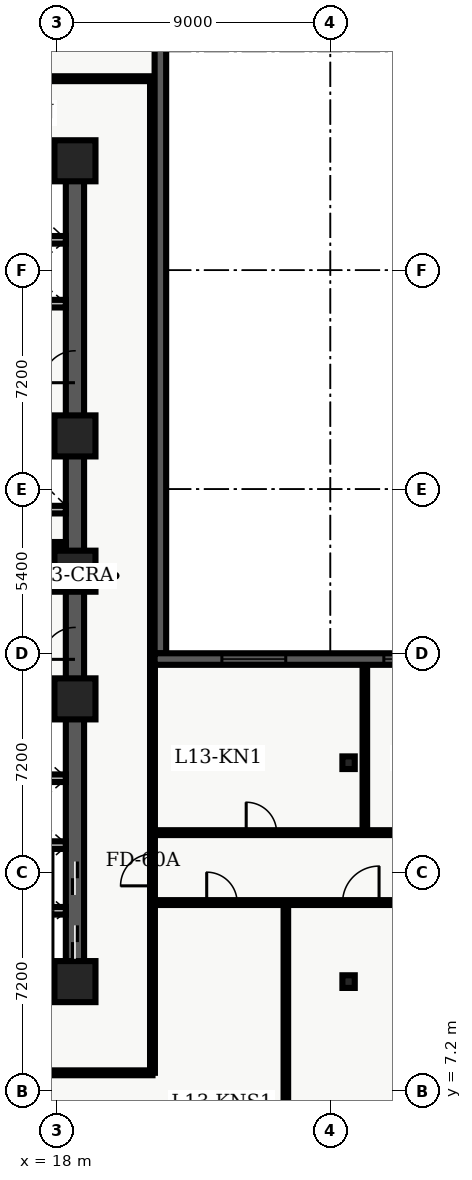
"""IFC4 building model, lengths in metres.
Left out: names, types, materials, properties, quantities, classifications, styles, units other than length and angle.
Written with IfcOpenShell. Run it as: python <this file> out.ifc"""

import sys

from ifc_helpers import new_model, entity, si_unit, converted_unit, direction, frame, origin_with_axes, origin_2d_with_axis, place, context, subcontext, project, spatial, polyline, rectangle, i_section, outline, extrude, element, fill, save


model = new_model("IFC4")
c1 = context("Model", 3, precision=1e-05, world=origin_with_axes(), true_north=direction((0.0, 1.0)))
c2 = subcontext(c1, "Body", "Model", "MODEL_VIEW")
j1 = project(units=[si_unit("LENGTHUNIT", "METRE"), converted_unit("PLANEANGLEUNIT", "DEGREE", entity("IfcPlaneAngleMeasure", 0.017), si_unit("PLANEANGLEUNIT", "RADIAN"), dimensions=[0, 0, 0, 0, 0, 0, 0])], contexts=[c1])
p1 = place(None, origin_with_axes())
s1 = spatial("IfcSite", under=j1, at=p1, CompositionType="ELEMENT")
p2 = place(p1, origin_with_axes())
s2 = spatial("IfcBuilding", under=s1, at=p2, CompositionType="ELEMENT")
p3 = place(p2, frame((0.0, 0.0, 56.1), z_axis=(0.0, 0.0, 1.0), x_axis=(1.0, 0.0, 0.0)))
s3 = spatial("IfcBuildingStorey", under=s2, at=p3, CompositionType="ELEMENT", Elevation=56.1)
p4 = place(p3, frame((11.4, 10.8, 0.0), z_axis=(0.0, 0.0, 1.0), x_axis=(1.0, 0.0, 0.0)))
e1 = element("IfcWall", 1, at=p4, inside=s3, PredefinedType="SHEAR", context=c2, shape_type="SweptSolid", body=[
    extrude(outline(polyline([(0.0, -0.3), (7.2, -0.3), (7.2, 0.3), (0.0, 0.3), (0.0, -0.3)])), origin_with_axes(), (0.0, 0.0, 1.0), 3.66),
])
p5 = place(p4, frame((2.625, 0.0, 0.0), z_axis=(0.0, 0.0, 1.0), x_axis=(1.0, 0.0, 0.0)))
e2 = element("IfcOpeningElement", 2, at=p5, cuts=e1, PredefinedType="OPENING", context=c2, shape_type="SweptSolid", body=[
    extrude(rectangle(XDim=1.05, YDim=0.62, at=origin_2d_with_axis()), origin_with_axes(), (0.0, 0.0, 1.0), 2.15),
])
p6 = place(p3, frame((11.4, 37.8, 0.0), z_axis=(0.0, 0.0, 1.0), x_axis=(1.0, 0.0, 0.0)))
e3 = element("IfcWall", 3, at=p6, inside=s3, PredefinedType="SHEAR", context=c2, shape_type="SweptSolid", body=[
    extrude(outline(polyline([(0.0, -0.3), (7.2, -0.3), (7.2, 0.3), (0.0, 0.3), (0.0, -0.3)])), origin_with_axes(), (0.0, 0.0, 1.0), 3.66),
])
p7 = place(p6, frame((2.625, 0.0, 0.0), z_axis=(0.0, 0.0, 1.0), x_axis=(1.0, 0.0, 0.0)))
e4 = element("IfcOpeningElement", 4, at=p7, cuts=e3, PredefinedType="OPENING", context=c2, shape_type="SweptSolid", body=[
    extrude(rectangle(XDim=1.05, YDim=0.62, at=origin_2d_with_axis()), origin_with_axes(), (0.0, 0.0, 1.0), 2.15),
])
p8 = place(p3, frame((18.6, 10.8, 0.0), z_axis=(0.0, 0.0, 1.0), x_axis=(0.0, 1.0, 0.0)))
e5 = element("IfcWall", 5, at=p8, inside=s3, PredefinedType="SHEAR", context=c2, shape_type="SweptSolid", body=[
    extrude(outline(polyline([(0.0, -0.3), (13.5, -0.3), (13.5, 0.3), (0.0, 0.3), (0.0, -0.3)])), origin_with_axes(), (0.0, 0.0, 1.0), 3.66),
])
p9 = place(p8, frame((1.3, 0.0, 0.0), z_axis=(0.0, 0.0, 1.0), x_axis=(1.0, 0.0, 0.0)))
e6 = element("IfcOpeningElement", 6, at=p9, cuts=e5, PredefinedType="OPENING", context=c2, shape_type="SweptSolid", body=[
    extrude(rectangle(XDim=1.1, YDim=0.62, at=origin_2d_with_axis()), origin_with_axes(), (0.0, 0.0, 1.0), 2.15),
])
p10 = place(p8, frame((3.4, 0.0, 0.0), z_axis=(0.0, 0.0, 1.0), x_axis=(1.0, 0.0, 0.0)))
e7 = element("IfcOpeningElement", 7, at=p10, cuts=e5, PredefinedType="OPENING", context=c2, shape_type="SweptSolid", body=[
    extrude(rectangle(XDim=1.1, YDim=0.62, at=origin_2d_with_axis()), origin_with_axes(), (0.0, 0.0, 1.0), 2.15),
])
p11 = place(p8, frame((11.125, 0.0, 0.0), z_axis=(0.0, 0.0, 1.0), x_axis=(1.0, 0.0, 0.0)))
e8 = element("IfcOpeningElement", 8, at=p11, cuts=e5, PredefinedType="OPENING", context=c2, shape_type="SweptSolid", body=[
    extrude(rectangle(XDim=1.05, YDim=0.62, at=origin_2d_with_axis()), origin_with_axes(), (0.0, 0.0, 1.0), 2.15),
])
p12 = place(p3, frame((18.6, 24.3, 0.0), z_axis=(0.0, 0.0, 1.0), x_axis=(0.0, 1.0, 0.0)))
e9 = element("IfcWall", 9, at=p12, inside=s3, PredefinedType="SHEAR", context=c2, shape_type="SweptSolid", body=[
    extrude(outline(polyline([(0.0, -0.3), (13.5, -0.3), (13.5, 0.3), (0.0, 0.3), (0.0, -0.3)])), origin_with_axes(), (0.0, 0.0, 1.0), 3.66),
])
p13 = place(p12, frame((6.725, 0.0, 0.0), z_axis=(0.0, 0.0, 1.0), x_axis=(1.0, 0.0, 0.0)))
e10 = element("IfcOpeningElement", 10, at=p13, cuts=e9, PredefinedType="OPENING", context=c2, shape_type="SweptSolid", body=[
    extrude(rectangle(XDim=1.05, YDim=0.62, at=origin_2d_with_axis()), origin_with_axes(), (0.0, 0.0, 1.0), 2.15),
])
for number, where, z_axis, x_axis in (
    (11, (11.7, 19.825, 0.0), (0.0, 0.0, 1.0), (1.0, 0.0, 0.0)),
    (12, (11.7, 28.775, 0.0), (0.0, 0.0, 1.0), (1.0, 0.0, 0.0)),
):
    element("IfcWall", number, at=place(p3, frame(where, z_axis=z_axis, x_axis=x_axis)), inside=s3, PredefinedType="SHEAR", context=c2, shape_type="SweptSolid", body=[
        extrude(outline(polyline([(0.0, -0.125), (6.6, -0.125), (6.6, 0.125), (0.0, 0.125), (0.0, -0.125)])), origin_with_axes(), (0.0, 0.0, 1.0), 3.66),
    ])
p14 = place(p3, frame((11.7, 24.1, 0.0), z_axis=(0.0, 0.0, 1.0), x_axis=(1.0, 0.0, 0.0)))
e13 = element("IfcWall", 13, at=p14, inside=s3, PredefinedType="SOLIDWALL", context=c2, shape_type="SweptSolid", body=[
    extrude(outline(polyline([(0.0, -0.125), (6.6, -0.125), (6.6, 0.125), (0.0, 0.125), (0.0, -0.125)])), origin_with_axes(), (0.0, 0.0, 1.0), 2.7),
])
p15 = place(p14, frame((3.75, 0.0, 0.0), z_axis=(0.0, 0.0, 1.0), x_axis=(1.0, 0.0, 0.0)))
e14 = element("IfcOpeningElement", 14, at=p15, cuts=e13, PredefinedType="OPENING", context=c2, shape_type="SweptSolid", body=[
    extrude(rectangle(XDim=0.9, YDim=0.27, at=origin_2d_with_axis()), origin_with_axes(), (0.0, 0.0, 1.0), 2.15),
])
p16 = place(p3, frame((11.7, 26.325, 0.0), z_axis=(0.0, 0.0, 1.0), x_axis=(1.0, 0.0, 0.0)))
e15 = element("IfcWall", 15, at=p16, inside=s3, PredefinedType="SOLIDWALL", context=c2, shape_type="SweptSolid", body=[
    extrude(outline(polyline([(0.0, -0.125), (6.6, -0.125), (6.6, 0.125), (0.0, 0.125), (0.0, -0.125)])), origin_with_axes(), (0.0, 0.0, 1.0), 2.7),
])
p17 = place(p16, frame((3.5, 0.0, 0.0), z_axis=(0.0, 0.0, 1.0), x_axis=(1.0, 0.0, 0.0)))
e16 = element("IfcOpeningElement", 16, at=p17, cuts=e15, PredefinedType="OPENING", context=c2, shape_type="SweptSolid", body=[
    extrude(rectangle(XDim=0.9, YDim=0.27, at=origin_2d_with_axis()), origin_with_axes(), (0.0, 0.0, 1.0), 2.15),
])
for number, where, z_axis, x_axis in (
    (17, (18.6, 10.8, 0.0), (0.0, 0.0, 1.0), (1.0, 0.0, 0.0)),
    (18, (18.6, 20.1, 0.0), (0.0, 0.0, 1.0), (1.0, 0.0, 0.0)),
    (19, (18.6, 24.3, 0.0), (0.0, 0.0, 1.0), (1.0, 0.0, 0.0)),
    (20, (18.6, 28.75, 0.0), (0.0, 0.0, 1.0), (1.0, 0.0, 0.0)),
    (21, (18.6, 37.8, 0.0), (0.0, 0.0, 1.0), (1.0, 0.0, 0.0)),
):
    element("IfcColumn", number, at=place(p3, frame(where, z_axis=z_axis, x_axis=x_axis)), inside=s3, PredefinedType="COLUMN", context=c2, shape_type="SweptSolid", body=[
        extrude(rectangle(XDim=1.35, YDim=1.35, at=origin_2d_with_axis()), origin_with_axes(), (0.0, 0.0, 1.0), 3.9),
    ])
for number, where, z_axis, x_axis in (
    (22, (27.6, 10.8, 0.0), (0.0, 0.0, 1.0), (1.0, 0.0, 0.0)),
    (23, (27.6, 18.0, 0.0), (0.0, 0.0, 1.0), (1.0, 0.0, 0.0)),
):
    element("IfcColumn", number, at=place(p3, frame(where, z_axis=z_axis, x_axis=x_axis)), inside=s3, PredefinedType="COLUMN", context=c2, shape_type="SweptSolid", body=[
        extrude(i_section(OverallWidth=0.406, OverallDepth=0.416, WebThickness=0.03, FlangeThickness=0.048, FilletRadius=0.022, at=origin_2d_with_axis()), origin_with_axes(), (0.0, 0.0, 1.0), 3.9),
    ])
p18 = place(p3, frame((14.62, 25.18, 0.0), z_axis=(0.0, 0.0, 1.0), x_axis=(1.0, 0.0, 0.0)))
e24 = element("IfcWall", 24, at=p18, inside=s3, PredefinedType="PARTITIONING", context=c2, shape_type="SweptSolid", body=[
    extrude(outline(polyline([(0.0, -0.08), (3.68, -0.08), (3.68, 0.08), (0.0, 0.08), (0.0, -0.08)])), origin_with_axes(), (0.0, 0.0, 1.0), 2.7),
])
p19 = place(p18, frame((1.95, 0.0, 0.0), z_axis=(0.0, 0.0, 1.0), x_axis=(1.0, 0.0, 0.0)))
e25 = element("IfcOpeningElement", 25, at=p19, cuts=e24, PredefinedType="OPENING", context=c2, shape_type="SweptSolid", body=[
    extrude(rectangle(XDim=0.9, YDim=0.18, at=origin_2d_with_axis()), origin_with_axes(), (0.0, 0.0, 1.0), 2.15),
])
for number, where, z_axis, x_axis in (
    (26, (15.84, 13.13, 0.0), (0.0, 0.0, 1.0), (1.0, 0.0, 0.0)),
    (27, (15.84, 15.29, 0.0), (0.0, 0.0, 1.0), (1.0, 0.0, 0.0)),
    (28, (15.84, 17.49, 0.0), (0.0, 0.0, 1.0), (1.0, 0.0, 0.0)),
    (29, (15.84, 33.1, 0.0), (0.0, 0.0, 1.0), (1.0, 0.0, 0.0)),
    (30, (15.84, 35.2, 0.0), (0.0, 0.0, 1.0), (1.0, 0.0, 0.0)),
):
    element("IfcWall", number, at=place(p3, frame(where, z_axis=z_axis, x_axis=x_axis)), inside=s3, PredefinedType="SOLIDWALL", context=c2, shape_type="SweptSolid", body=[
        extrude(outline(polyline([(0.0, -0.125), (2.46, -0.125), (2.46, 0.125), (0.0, 0.125), (0.0, -0.125)])), origin_with_axes(), (0.0, 0.0, 1.0), 2.7),
    ])
p20 = place(p3, frame((2.6, 7.8, 0.0), z_axis=(0.0, 0.0, 1.0), x_axis=(1.0, 0.0, 0.0)))
e31 = element("IfcWall", 31, at=p20, inside=s3, PredefinedType="PARTITIONING", context=c2, shape_type="SweptSolid", body=[
    extrude(outline(polyline([(0.0, -0.08), (18.55, -0.08), (18.55, 0.08), (0.0, 0.08), (0.0, -0.08)])), origin_with_axes(), (0.0, 0.0, 1.0), 2.7),
])
p21 = place(p20, frame((2.91, 0.0, 0.0), z_axis=(0.0, 0.0, 1.0), x_axis=(1.0, 0.0, 0.0)))
e32 = element("IfcOpeningElement", 32, at=p21, cuts=e31, PredefinedType="OPENING", context=c2, shape_type="SweptSolid", body=[
    extrude(rectangle(XDim=1.2, YDim=0.18, at=origin_2d_with_axis()), origin_with_axes(), (0.0, 0.0, 1.0), 2.2),
])
p22 = place(p20, frame((13.415, 0.0, 0.0), z_axis=(0.0, 0.0, 1.0), x_axis=(1.0, 0.0, 0.0)))
e33 = element("IfcOpeningElement", 33, at=p22, cuts=e31, PredefinedType="OPENING", context=c2, shape_type="SweptSolid", body=[
    extrude(rectangle(XDim=1.0, YDim=0.18, at=origin_2d_with_axis()), origin_with_axes(), (0.0, 0.0, 1.0), 2.15),
])
p23 = place(p3, frame((2.6, 40.5, 0.0), z_axis=(0.0, 0.0, 1.0), x_axis=(1.0, 0.0, 0.0)))
e34 = element("IfcWall", 34, at=p23, inside=s3, PredefinedType="PARTITIONING", context=c2, shape_type="SweptSolid", body=[
    extrude(outline(polyline([(0.0, -0.08), (18.65, -0.08), (18.65, 0.08), (0.0, 0.08), (0.0, -0.08)])), origin_with_axes(), (0.0, 0.0, 1.0), 2.7),
])
p24 = place(p23, frame((2.915, 0.0, 0.0), z_axis=(0.0, 0.0, 1.0), x_axis=(1.0, 0.0, 0.0)))
e35 = element("IfcOpeningElement", 35, at=p24, cuts=e34, PredefinedType="OPENING", context=c2, shape_type="SweptSolid", body=[
    extrude(rectangle(XDim=1.0, YDim=0.18, at=origin_2d_with_axis()), origin_with_axes(), (0.0, 0.0, 1.0), 2.15),
])
p25 = place(p23, frame((9.254, 0.0, 0.0), z_axis=(0.0, 0.0, 1.0), x_axis=(1.0, 0.0, 0.0)))
e36 = element("IfcOpeningElement", 36, at=p25, cuts=e34, PredefinedType="OPENING", context=c2, shape_type="SweptSolid", body=[
    extrude(rectangle(XDim=1.2, YDim=0.18, at=origin_2d_with_axis()), origin_with_axes(), (0.0, 0.0, 1.0), 2.2),
])
p26 = place(p23, frame((14.543, 0.0, 0.0), z_axis=(0.0, 0.0, 1.0), x_axis=(1.0, 0.0, 0.0)))
e37 = element("IfcOpeningElement", 37, at=p26, cuts=e34, PredefinedType="OPENING", context=c2, shape_type="SweptSolid", body=[
    extrude(rectangle(XDim=1.0, YDim=0.18, at=origin_2d_with_axis()), origin_with_axes(), (0.0, 0.0, 1.0), 2.15),
])
p27 = place(p3, frame((21.15, 7.8, 0.0), z_axis=(0.0, 0.0, 1.0), x_axis=(0.0, 1.0, 0.0)))
e38 = element("IfcWall", 38, at=p27, inside=s3, PredefinedType="PARTITIONING", context=c2, shape_type="SweptSolid", body=[
    extrude(outline(polyline([(0.0, -0.08), (32.7, -0.08), (32.7, 0.08), (0.0, 0.08), (0.0, -0.08)])), origin_with_axes(), (0.0, 0.0, 1.0), 2.7),
])
p28 = place(p27, frame((6.675, 0.0, 0.0), z_axis=(0.0, 0.0, 1.0), x_axis=(1.0, 0.0, 0.0)))
e39 = element("IfcOpeningElement", 39, at=p28, cuts=e38, PredefinedType="OPENING", context=c2, shape_type="SweptSolid", body=[
    extrude(rectangle(XDim=1.05, YDim=0.18, at=origin_2d_with_axis()), origin_with_axes(), (0.0, 0.0, 1.0), 2.15),
])
p29 = place(p3, frame((21.15, 13.4, 0.0), z_axis=(0.0, 0.0, 1.0), x_axis=(1.0, 0.0, 0.0)))
e40 = element("IfcWall", 40, at=p29, inside=s3, PredefinedType="PARTITIONING", context=c2, shape_type="SweptSolid", body=[
    extrude(outline(polyline([(0.0, -0.08), (15.2, -0.08), (15.2, 0.08), (0.0, 0.08), (0.0, -0.08)])), origin_with_axes(), (0.0, 0.0, 1.0), 2.7),
])
p30 = place(p29, frame((2.284, 0.0, 0.0), z_axis=(0.0, 0.0, 1.0), x_axis=(1.0, 0.0, 0.0)))
e41 = element("IfcOpeningElement", 41, at=p30, cuts=e40, PredefinedType="OPENING", context=c2, shape_type="SweptSolid", body=[
    extrude(rectangle(XDim=1.0, YDim=0.18, at=origin_2d_with_axis()), origin_with_axes(), (0.0, 0.0, 1.0), 2.15),
])
p31 = place(p29, frame((6.853, 0.0, 0.0), z_axis=(0.0, 0.0, 1.0), x_axis=(1.0, 0.0, 0.0)))
e42 = element("IfcOpeningElement", 42, at=p31, cuts=e40, PredefinedType="OPENING", context=c2, shape_type="SweptSolid", body=[
    extrude(rectangle(XDim=1.2, YDim=0.18, at=origin_2d_with_axis()), origin_with_axes(), (0.0, 0.0, 1.0), 2.2),
])
p32 = place(p29, frame((12.219, 0.0, 0.0), z_axis=(0.0, 0.0, 1.0), x_axis=(1.0, 0.0, 0.0)))
e43 = element("IfcOpeningElement", 43, at=p32, cuts=e40, PredefinedType="OPENING", context=c2, shape_type="SweptSolid", body=[
    extrude(rectangle(XDim=1.0, YDim=0.18, at=origin_2d_with_axis()), origin_with_axes(), (0.0, 0.0, 1.0), 2.15),
])
p33 = place(p3, frame((21.15, 15.7, 0.0), z_axis=(0.0, 0.0, 1.0), x_axis=(1.0, 0.0, 0.0)))
e44 = element("IfcWall", 44, at=p33, inside=s3, PredefinedType="PARTITIONING", context=c2, shape_type="SweptSolid", body=[
    extrude(outline(polyline([(0.0, -0.08), (15.2, -0.08), (15.2, 0.08), (0.0, 0.08), (0.0, -0.08)])), origin_with_axes(), (0.0, 0.0, 1.0), 2.7),
])
p34 = place(p33, frame((3.583, 0.0, 0.0), z_axis=(0.0, 0.0, 1.0), x_axis=(1.0, 0.0, 0.0)))
e45 = element("IfcOpeningElement", 45, at=p34, cuts=e44, PredefinedType="OPENING", context=c2, shape_type="SweptSolid", body=[
    extrude(rectangle(XDim=1.0, YDim=0.18, at=origin_2d_with_axis()), origin_with_axes(), (0.0, 0.0, 1.0), 2.15),
])
p35 = place(p33, frame((11.053, 0.0, 0.0), z_axis=(0.0, 0.0, 1.0), x_axis=(1.0, 0.0, 0.0)))
e46 = element("IfcOpeningElement", 46, at=p35, cuts=e44, PredefinedType="OPENING", context=c2, shape_type="SweptSolid", body=[
    extrude(rectangle(XDim=1.0, YDim=0.18, at=origin_2d_with_axis()), origin_with_axes(), (0.0, 0.0, 1.0), 2.15),
])
p36 = place(p3, frame((25.537, 0.36, 0.0), z_axis=(0.0, 0.0, 1.0), x_axis=(0.0, 1.0, 0.0)))
e47 = element("IfcWall", 47, at=p36, inside=s3, PredefinedType="PARTITIONING", context=c2, shape_type="SweptSolid", body=[
    extrude(outline(polyline([(0.0, -0.075), (12.92, -0.075), (12.92, 0.075), (0.0, 0.075), (0.0, -0.075)])), origin_with_axes(), (0.0, 0.0, 1.0), 2.7),
])
p37 = place(p3, frame((28.135, 15.82, 0.0), z_axis=(0.0, 0.0, 1.0), x_axis=(0.0, 1.0, 0.0)))
e48 = element("IfcWall", 48, at=p37, inside=s3, PredefinedType="PARTITIONING", context=c2, shape_type="SweptSolid", body=[
    extrude(outline(polyline([(0.0, -0.075), (5.405, -0.075), (5.405, 0.075), (0.0, 0.075), (0.0, -0.075)])), origin_with_axes(), (0.0, 0.0, 1.0), 2.7),
])
p38 = place(p3, frame((21.41, 45.82, 0.0), z_axis=(0.0, 0.0, 1.0), x_axis=(0.0, -1.0, 0.0)))
e49 = element("IfcWall", 49, at=p38, inside=s3, PredefinedType="SOLIDWALL", context=c2, shape_type="SweptSolid", body=[
    extrude(outline(polyline([(0.0, -0.19), (24.22, -0.19), (24.22, 0.19), (0.0, 0.19), (0.0, -0.19)])), origin_with_axes(), (0.0, 0.0, 1.0), 3.66),
])
p39 = place(p38, frame((2.902, 0.0, 0.45), z_axis=(0.0, 0.0, 1.0), x_axis=(1.0, 0.0, 0.0)))
e50 = element("IfcOpeningElement", 50, at=p39, cuts=e49, PredefinedType="OPENING", context=c2, shape_type="SweptSolid", body=[
    extrude(rectangle(XDim=2.1, YDim=0.4, at=origin_2d_with_axis()), origin_with_axes(), (0.0, 0.0, 1.0), 2.2),
])
p40 = place(p3, frame((21.22, 21.41, 0.0), z_axis=(0.0, 0.0, 1.0), x_axis=(1.0, 0.0, 0.0)))
e51 = element("IfcWall", 51, at=p40, inside=s3, PredefinedType="SOLIDWALL", context=c2, shape_type="SweptSolid", body=[
    extrude(outline(polyline([(0.0, -0.19), (17.18, -0.19), (17.18, 0.19), (0.0, 0.19), (0.0, -0.19)])), origin_with_axes(), (0.0, 0.0, 1.0), 3.66),
])
p41 = place(p40, frame((3.263, 0.0, 0.45), z_axis=(0.0, 0.0, 1.0), x_axis=(1.0, 0.0, 0.0)))
e52 = element("IfcOpeningElement", 52, at=p41, cuts=e51, PredefinedType="OPENING", context=c2, shape_type="SweptSolid", body=[
    extrude(rectangle(XDim=2.1, YDim=0.4, at=origin_2d_with_axis()), origin_with_axes(), (0.0, 0.0, 1.0), 2.2),
])
p42 = place(p40, frame((8.59, 0.0, 0.45), z_axis=(0.0, 0.0, 1.0), x_axis=(1.0, 0.0, 0.0)))
e53 = element("IfcOpeningElement", 53, at=p42, cuts=e51, PredefinedType="OPENING", context=c2, shape_type="SweptSolid", body=[
    extrude(rectangle(XDim=2.1, YDim=0.4, at=origin_2d_with_axis()), origin_with_axes(), (0.0, 0.0, 1.0), 2.2),
])
p43 = place(p40, frame((13.467, 0.0, 0.45), z_axis=(0.0, 0.0, 1.0), x_axis=(1.0, 0.0, 0.0)))
e54 = element("IfcOpeningElement", 54, at=p43, cuts=e51, PredefinedType="OPENING", context=c2, shape_type="SweptSolid", body=[
    extrude(rectangle(XDim=2.1, YDim=0.4, at=origin_2d_with_axis()), origin_with_axes(), (0.0, 0.0, 1.0), 2.2),
])
p44 = place(p8, frame((1.3, 0.0, 0.0), z_axis=(0.0, 0.0, 1.0), x_axis=(1.0, 0.0, 0.0)))
e55 = element("IfcDoor", 55, at=p44, inside=s3, OperationType="SLIDING_TO_LEFT", PredefinedType="DOOR", context=c2, shape_type="SweptSolid", body=[
    extrude(rectangle(XDim=1.1, YDim=0.09, at=origin_2d_with_axis()), origin_with_axes(), (0.0, 0.0, 1.0), 2.15),
])
fill(e6, e55)
p45 = place(p8, frame((3.4, 0.0, 0.0), z_axis=(0.0, 0.0, 1.0), x_axis=(1.0, 0.0, 0.0)))
e56 = element("IfcDoor", 56, at=p45, inside=s3, OperationType="SLIDING_TO_RIGHT", PredefinedType="DOOR", context=c2, shape_type="SweptSolid", body=[
    extrude(rectangle(XDim=1.1, YDim=0.09, at=origin_2d_with_axis()), origin_with_axes(), (0.0, 0.0, 1.0), 2.15),
])
fill(e7, e56)
p46 = place(p8, frame((11.125, 0.0, 0.0), z_axis=(0.0, 0.0, 1.0), x_axis=(1.0, 0.0, 0.0)))
e57 = element("IfcDoor", 57, at=p46, inside=s3, OperationType="SINGLE_SWING_LEFT", PredefinedType="DOOR", context=c2, shape_type="SweptSolid", body=[
    extrude(rectangle(XDim=1.05, YDim=0.09, at=origin_2d_with_axis()), origin_with_axes(), (0.0, 0.0, 1.0), 2.15),
])
fill(e8, e57)
p47 = place(p12, frame((6.725, 0.0, 0.0), z_axis=(0.0, 0.0, 1.0), x_axis=(1.0, 0.0, 0.0)))
e58 = element("IfcDoor", 58, at=p47, inside=s3, OperationType="SINGLE_SWING_LEFT", PredefinedType="DOOR", context=c2, shape_type="SweptSolid", body=[
    extrude(rectangle(XDim=1.05, YDim=0.09, at=origin_2d_with_axis()), origin_with_axes(), (0.0, 0.0, 1.0), 2.15),
])
fill(e10, e58)
p48 = place(p27, frame((6.675, 0.0, 0.0), z_axis=(0.0, 0.0, 1.0), x_axis=(1.0, 0.0, 0.0)))
e59 = element("IfcDoor", 59, at=p48, inside=s3, OperationType="SINGLE_SWING_LEFT", PredefinedType="DOOR", context=c2, shape_type="SweptSolid", body=[
    extrude(rectangle(XDim=1.05, YDim=0.09, at=origin_2d_with_axis()), origin_with_axes(), (0.0, 0.0, 1.0), 2.15),
])
fill(e39, e59)
p49 = place(p29, frame((2.284, 0.0, 0.0), z_axis=(0.0, 0.0, 1.0), x_axis=(1.0, 0.0, 0.0)))
e60 = element("IfcDoor", 60, at=p49, inside=s3, OperationType="SINGLE_SWING_LEFT", PredefinedType="DOOR", context=c2, shape_type="SweptSolid", body=[
    extrude(rectangle(XDim=1.0, YDim=0.09, at=origin_2d_with_axis()), origin_with_axes(), (0.0, 0.0, 1.0), 2.15),
])
fill(e41, e60)
p50 = place(p29, frame((6.853, 0.0, 0.0), z_axis=(0.0, 0.0, 1.0), x_axis=(1.0, 0.0, 0.0)))
e61 = element("IfcDoor", 61, at=p50, inside=s3, OperationType="SINGLE_SWING_RIGHT", PredefinedType="DOOR", context=c2, shape_type="SweptSolid", body=[
    extrude(rectangle(XDim=1.2, YDim=0.09, at=origin_2d_with_axis()), origin_with_axes(), (0.0, 0.0, 1.0), 2.2),
])
fill(e42, e61)
p51 = place(p33, frame((3.583, 0.0, 0.0), z_axis=(0.0, 0.0, 1.0), x_axis=(1.0, 0.0, 0.0)))
e62 = element("IfcDoor", 62, at=p51, inside=s3, OperationType="SINGLE_SWING_LEFT", PredefinedType="DOOR", context=c2, shape_type="SweptSolid", body=[
    extrude(rectangle(XDim=1.0, YDim=0.09, at=origin_2d_with_axis()), origin_with_axes(), (0.0, 0.0, 1.0), 2.15),
])
fill(e45, e62)
p52 = place(p40, frame((3.263, 0.0, 0.45), z_axis=(0.0, 0.0, 1.0), x_axis=(1.0, 0.0, 0.0)))
e63 = element("IfcWindow", 63, at=p52, inside=s3, PredefinedType="WINDOW", context=c2, shape_type="SweptSolid", body=[
    extrude(rectangle(XDim=2.1, YDim=0.09, at=origin_2d_with_axis()), origin_with_axes(), (0.0, 0.0, 1.0), 2.2),
])
fill(e52, e63)
p53 = place(p40, frame((8.59, 0.0, 0.45), z_axis=(0.0, 0.0, 1.0), x_axis=(1.0, 0.0, 0.0)))
e64 = element("IfcWindow", 64, at=p53, inside=s3, PredefinedType="WINDOW", context=c2, shape_type="SweptSolid", body=[
    extrude(rectangle(XDim=2.1, YDim=0.09, at=origin_2d_with_axis()), origin_with_axes(), (0.0, 0.0, 1.0), 2.2),
])
fill(e53, e64)
save(model, sys.argv[1])
